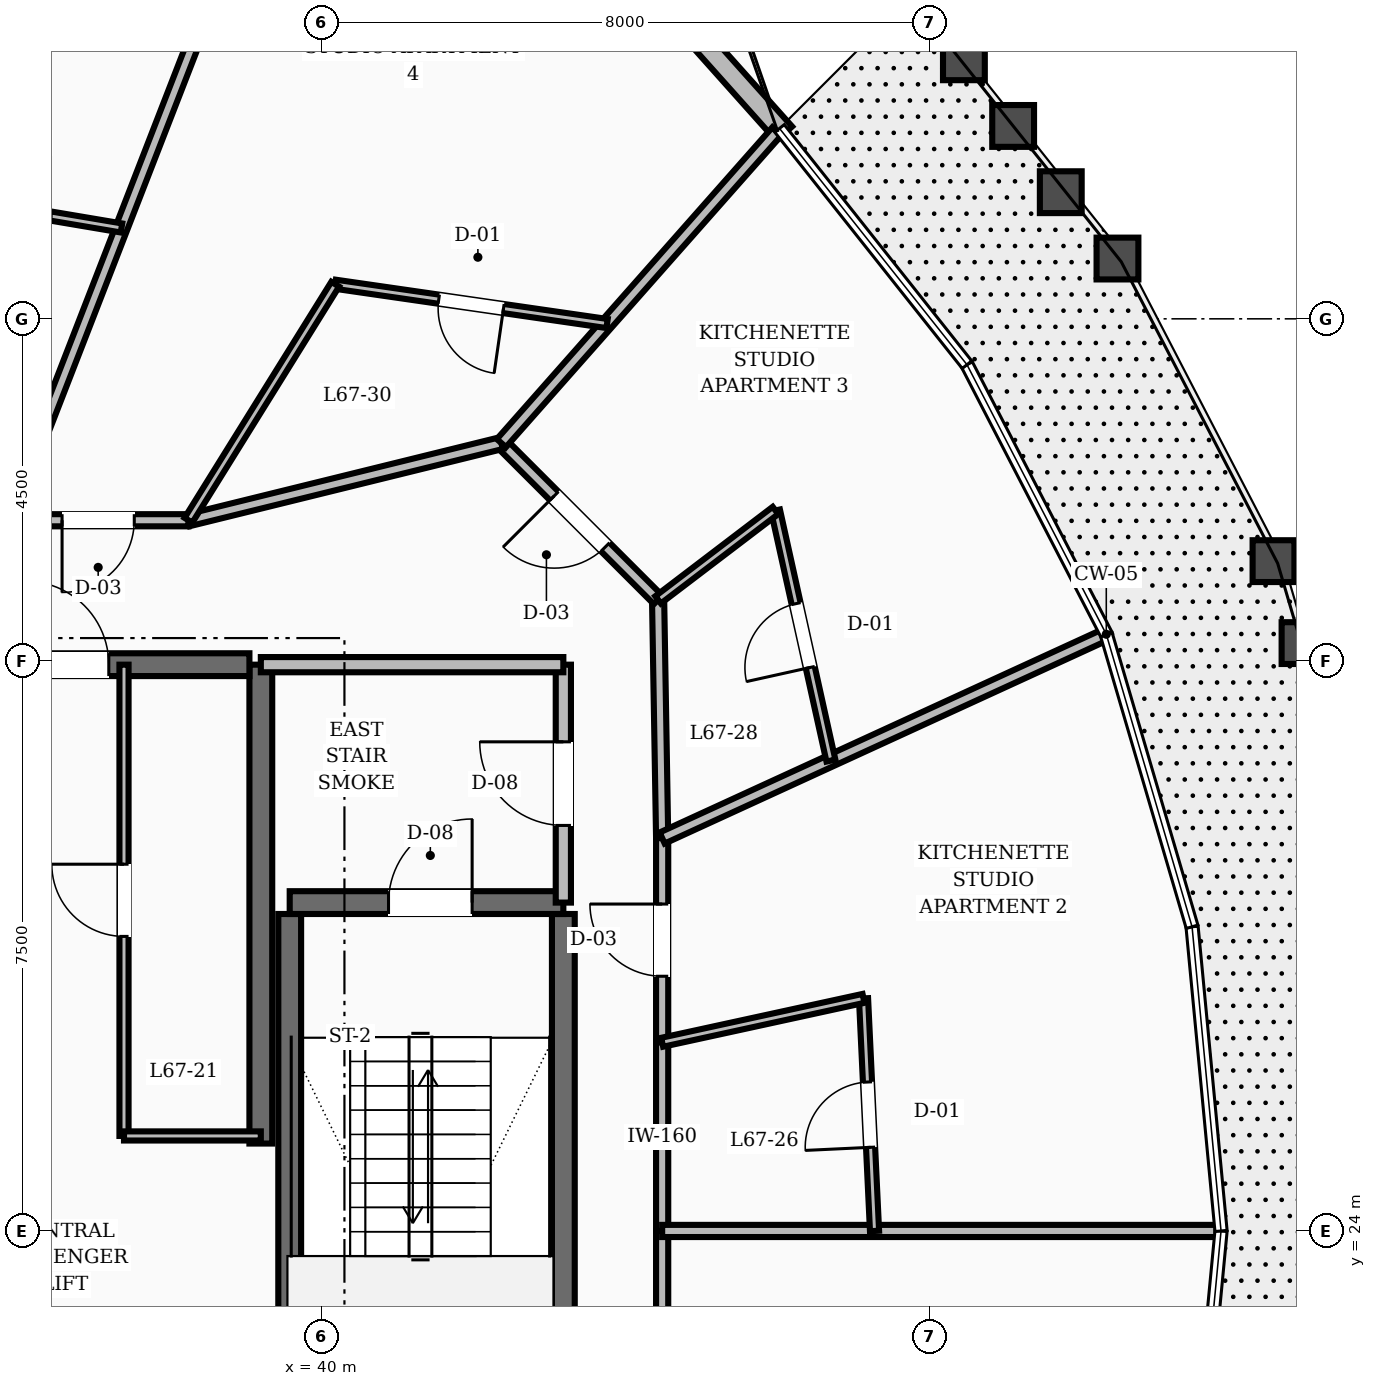
"""IFC4 building model, lengths in metres.
Left out: names, types, materials, properties, quantities, classifications, styles, units other than length and angle.
Written with IfcOpenShell. Run it as: python <this file> out.ifc"""

import sys

from ifc_helpers import new_model, si_unit, direction, frame, frame_2d, origin, place, context, subcontext, project, spatial, rectangle, extrude, element, fill, save


model = new_model("IFC4")
c1 = context("Model", 3, precision=1e-05, world=origin(), true_north=direction((0.0, 1.0)))
c2 = subcontext(c1, "Body", "Model", "MODEL_VIEW")
j1 = project(units=[si_unit("LENGTHUNIT", "METRE"), si_unit("PLANEANGLEUNIT", "RADIAN")], contexts=[c1])
p1 = place(None, origin())
s1 = spatial("IfcSite", under=j1, at=p1, CompositionType="ELEMENT")
p2 = place(p1, origin())
s2 = spatial("IfcBuilding", under=s1, at=p2, CompositionType="ELEMENT")
p3 = place(p2, frame((0.0, 0.0, 258.0)))
s3 = spatial("IfcBuildingStorey", under=s2, at=p3, CompositionType="ELEMENT", Elevation=258.0)
p4 = place(p3, frame((39.2, 25.15, 0.0), z_axis=(0.0, 0.0, 1.0), x_axis=(0.0, 1.0, 0.0)))
e1 = element("IfcWall", 1, at=p4, inside=s3, PredefinedType="SHEAR", context=c2, shape_type="SweptSolid", body=[
    extrude(rectangle(XDim=6.3, YDim=0.3, at=frame_2d((3.15, 0.0))), origin(), (0.0, 0.0, 1.0), 3.6),
])
p5 = place(p3, frame((35.8, 31.45, 0.0), z_axis=(0.0, 0.0, 1.0), x_axis=(1.0, 0.0, 0.0)))
e2 = element("IfcWall", 2, at=p5, inside=s3, PredefinedType="SHEAR", context=c2, shape_type="SweptSolid", body=[
    extrude(rectangle(XDim=3.25, YDim=0.3, at=frame_2d((1.625, 0.0))), origin(), (0.0, 0.0, 1.0), 3.6),
])
p6 = place(p5, frame((0.3, 0.0, 0.0)))
e3 = element("IfcOpeningElement", 3, at=p6, cuts=e2, PredefinedType="OPENING", context=c2, shape_type="SweptSolid", body=[
    extrude(rectangle(XDim=1.1, YDim=2.1, at=frame_2d((0.55, 1.05))), frame((0.0, 0.16, 0.0), z_axis=(0.0, -1.0, 0.0), x_axis=(1.0, 0.0, 0.0)), (0.0, 0.0, 1.0), 0.32),
])
for number, where, z_axis, x_axis in (
    (4, (43.18, 19.43, 0.0), (0.0, 0.0, 1.0), (0.0, 1.0, 0.0)),
    (5, (39.58, 19.43, 0.0), (0.0, 0.0, 1.0), (0.0, 1.0, 0.0)),
):
    element("IfcWall", number, at=place(p3, frame(where, z_axis=z_axis, x_axis=x_axis)), inside=s3, PredefinedType="SHEAR", context=c2, shape_type="SweptSolid", body=[
        extrude(rectangle(XDim=8.74, YDim=0.3, at=frame_2d((4.37, 0.0))), origin(), (0.0, 0.0, 1.0), 3.6),
    ])
p7 = place(p3, frame((39.58, 28.32, 0.0), z_axis=(0.0, 0.0, 1.0), x_axis=(1.0, 0.0, 0.0)))
e6 = element("IfcWall", 6, at=p7, inside=s3, PredefinedType="SHEAR", context=c2, shape_type="SweptSolid", body=[
    extrude(rectangle(XDim=3.6, YDim=0.3, at=frame_2d((1.8, 0.0))), origin(), (0.0, 0.0, 1.0), 3.6),
])
p8 = place(p7, frame((1.3, 0.0, 0.0)))
e7 = element("IfcOpeningElement", 7, at=p8, cuts=e6, PredefinedType="OPENING", context=c2, shape_type="SweptSolid", body=[
    extrude(rectangle(XDim=1.1, YDim=2.1, at=frame_2d((0.55, 1.05))), frame((0.0, 0.16, 0.0), z_axis=(0.0, -1.0, 0.0), x_axis=(1.0, 0.0, 0.0)), (0.0, 0.0, 1.0), 0.32),
])
p9 = place(p3, frame((46.085, 38.437, 0.0), z_axis=(0.0, 0.0, 1.0), x_axis=(-0.666145944146, 0.745821413677, 0.0)))
e8 = element("IfcWall", 8, at=p9, inside=s3, PredefinedType="STANDARD", context=c2, shape_type="SweptSolid", body=[
    extrude(rectangle(XDim=4.137, YDim=0.28, at=frame_2d((2.068, 0.0))), origin(), (0.0, 0.0, 1.0), 2.88),
])
p10 = place(p3, frame((43.18, 28.32, 0.0), z_axis=(0.0, 0.0, 1.0), x_axis=(0.0, 1.0, 0.0)))
e9 = element("IfcWall", 9, at=p10, inside=s3, PredefinedType="SOLIDWALL", context=c2, shape_type="SweptSolid", body=[
    extrude(rectangle(XDim=3.13, YDim=0.2, at=frame_2d((1.565, 0.0))), origin(), (0.0, 0.0, 1.0), 2.87),
])
p11 = place(p10, frame((1.015, 0.0, 0.0)))
e10 = element("IfcOpeningElement", 10, at=p11, cuts=e9, PredefinedType="OPENING", context=c2, shape_type="SweptSolid", body=[
    extrude(rectangle(XDim=1.1, YDim=2.1, at=frame_2d((0.55, 1.05))), frame((0.0, 0.11, 0.0), z_axis=(0.0, -1.0, 0.0), x_axis=(1.0, 0.0, 0.0)), (0.0, 0.0, 1.0), 0.22),
])
p12 = place(p3, frame((39.2, 31.45, 0.0), z_axis=(0.0, 0.0, 1.0), x_axis=(1.0, 0.0, 0.0)))
e11 = element("IfcWall", 11, at=p12, inside=s3, PredefinedType="SOLIDWALL", context=c2, shape_type="SweptSolid", body=[
    extrude(rectangle(XDim=3.98, YDim=0.2, at=frame_2d((1.99, 0.0))), origin(), (0.0, 0.0, 1.0), 2.87),
])
p13 = place(p3, frame((37.4, 25.25, 0.0), z_axis=(0.0, 0.0, 1.0), x_axis=(0.0, 1.0, 0.0)))
e12 = element("IfcWall", 12, at=p13, inside=s3, PredefinedType="PARTITIONING", context=c2, shape_type="SweptSolid", body=[
    extrude(rectangle(XDim=6.2, YDim=0.12, at=frame_2d((3.1, 0.0))), origin(), (0.0, 0.0, 1.0), 2.87),
])
p14 = place(p13, frame((2.625, 0.0, 0.0)))
e13 = element("IfcOpeningElement", 13, at=p14, cuts=e12, PredefinedType="OPENING", context=c2, shape_type="SweptSolid", body=[
    extrude(rectangle(XDim=0.95, YDim=2.1, at=frame_2d((0.475, 1.05))), frame((0.0, 0.07, 0.0), z_axis=(0.0, -1.0, 0.0), x_axis=(1.0, 0.0, 0.0)), (0.0, 0.0, 1.0), 0.14),
])
p15 = place(p3, frame((37.4, 25.25, 0.0), z_axis=(0.0, 0.0, 1.0), x_axis=(1.0, 0.0, 0.0)))
e14 = element("IfcWall", 14, at=p15, inside=s3, PredefinedType="PARTITIONING", context=c2, shape_type="SweptSolid", body=[
    extrude(rectangle(XDim=1.8, YDim=0.12, at=frame_2d((0.9, 0.0))), origin(), (0.0, 0.0, 1.0), 2.87),
])
p16 = place(p3, frame((44.48, 24.0, 0.0), z_axis=(0.0, 0.0, 1.0), x_axis=(0.0, 1.0, 0.0)))
e15 = element("IfcWall", 15, at=p16, inside=s3, PredefinedType="SOLIDWALL", context=c2, shape_type="SweptSolid", body=[
    extrude(rectangle(XDim=2.482, YDim=0.16, at=frame_2d((1.241, 0.0))), origin(), (0.0, 0.0, 1.0), 2.87),
])
p17 = place(p3, frame((44.48, 26.482, 0.0), z_axis=(0.0, 0.0, 1.0), x_axis=(0.0, 1.0, 0.0)))
e16 = element("IfcWall", 16, at=p17, inside=s3, PredefinedType="SOLIDWALL", context=c2, shape_type="SweptSolid", body=[
    extrude(rectangle(XDim=2.687, YDim=0.16, at=frame_2d((1.344, 0.0))), origin(), (0.0, 0.0, 1.0), 2.87),
])
p18 = place(p17, frame((0.868, 0.0, 0.0)))
e17 = element("IfcOpeningElement", 17, at=p18, cuts=e16, PredefinedType="OPENING", context=c2, shape_type="SweptSolid", body=[
    extrude(rectangle(XDim=0.95, YDim=2.1, at=frame_2d((0.475, 1.05))), frame((0.0, 0.09, 0.0), z_axis=(0.0, -1.0, 0.0), x_axis=(1.0, 0.0, 0.0)), (0.0, 0.0, 1.0), 0.18),
])
p19 = place(p3, frame((44.48, 29.169, 0.0), z_axis=(0.0, 0.0, 1.0), x_axis=(-0.016981035134, 0.999855811828, 0.0)))
e18 = element("IfcWall", 18, at=p19, inside=s3, PredefinedType="SOLIDWALL", context=c2, shape_type="SweptSolid", body=[
    extrude(rectangle(XDim=3.134, YDim=0.16, at=frame_2d((1.567, 0.0))), origin(), (0.0, 0.0, 1.0), 2.87),
])
p20 = place(p3, frame((44.427, 32.303, 0.0), z_axis=(0.0, 0.0, 1.0), x_axis=(-0.707106781187, 0.707106781187, 0.0)))
e19 = element("IfcWall", 19, at=p20, inside=s3, PredefinedType="SOLIDWALL", context=c2, shape_type="SweptSolid", body=[
    extrude(rectangle(XDim=2.916, YDim=0.16, at=frame_2d((1.458, 0.0))), origin(), (0.0, 0.0, 1.0), 2.87),
])
p21 = place(p20, frame((0.983, 0.0, 0.0)))
e20 = element("IfcOpeningElement", 20, at=p21, cuts=e19, PredefinedType="OPENING", context=c2, shape_type="SweptSolid", body=[
    extrude(rectangle(XDim=0.95, YDim=2.1, at=frame_2d((0.475, 1.05))), frame((0.0, 0.09, 0.0), z_axis=(0.0, -1.0, 0.0), x_axis=(1.0, 0.0, 0.0)), (0.0, 0.0, 1.0), 0.18),
])
p22 = place(p3, frame((42.365, 34.365, 0.0), z_axis=(0.0, 0.0, 1.0), x_axis=(-0.970939799552, -0.239323850978, 0.0)))
e21 = element("IfcWall", 21, at=p22, inside=s3, PredefinedType="SOLIDWALL", context=c2, shape_type="SweptSolid", body=[
    extrude(rectangle(XDim=4.241, YDim=0.16, at=frame_2d((2.12, 0.0))), origin(), (0.0, 0.0, 1.0), 2.87),
])
p23 = place(p3, frame((38.248, 33.35, 0.0), z_axis=(0.0, 0.0, 1.0), x_axis=(-1.0, 0.0, 0.0)))
e22 = element("IfcWall", 22, at=p23, inside=s3, PredefinedType="SOLIDWALL", context=c2, shape_type="SweptSolid", body=[
    extrude(rectangle(XDim=2.375, YDim=0.16, at=frame_2d((1.188, 0.0))), origin(), (0.0, 0.0, 1.0), 2.87),
])
p24 = place(p23, frame((0.712, 0.0, 0.0)))
e23 = element("IfcOpeningElement", 23, at=p24, cuts=e22, PredefinedType="OPENING", context=c2, shape_type="SweptSolid", body=[
    extrude(rectangle(XDim=0.95, YDim=2.1, at=frame_2d((0.475, 1.05))), frame((0.0, 0.09, 0.0), z_axis=(0.0, -1.0, 0.0), x_axis=(1.0, 0.0, 0.0)), (0.0, 0.0, 1.0), 0.18),
])
p25 = place(p3, frame((44.48, 21.518, 0.0), z_axis=(0.0, 0.0, 1.0), x_axis=(0.0, 1.0, 0.0)))
e24 = element("IfcWall", 24, at=p25, inside=s3, PredefinedType="SOLIDWALL", context=c2, shape_type="SweptSolid", body=[
    extrude(rectangle(XDim=2.482, YDim=0.16, at=frame_2d((1.241, 0.0))), origin(), (0.0, 0.0, 1.0), 2.87),
])
p26 = place(p3, frame((44.48, 24.0, 0.0), z_axis=(0.0, 0.0, 1.0), x_axis=(1.0, 0.0, 0.0)))
e25 = element("IfcWall", 25, at=p26, inside=s3, PredefinedType="SOLIDWALL", context=c2, shape_type="SweptSolid", body=[
    extrude(rectangle(XDim=7.303, YDim=0.16, at=frame_2d((3.651, 0.0))), origin(), (0.0, 0.0, 1.0), 2.87),
])
p27 = place(p3, frame((47.274, 24.0, 0.0), z_axis=(0.0, 0.0, 1.0), x_axis=(-0.047341736084, 0.998878751413, 0.0)))
e26 = element("IfcWall", 26, at=p27, inside=s3, PredefinedType="PARTITIONING", context=c2, shape_type="SweptSolid", body=[
    extrude(rectangle(XDim=3.063, YDim=0.12, at=frame_2d((1.532, 0.0))), origin(), (0.0, 0.0, 1.0), 2.87),
])
p28 = place(p27, frame((1.102, 0.0, 0.0)))
e27 = element("IfcOpeningElement", 27, at=p28, cuts=e26, PredefinedType="OPENING", context=c2, shape_type="SweptSolid", body=[
    extrude(rectangle(XDim=0.86, YDim=2.1, at=frame_2d((0.43, 1.05))), frame((0.0, 0.07, 0.0), z_axis=(0.0, -1.0, 0.0), x_axis=(1.0, 0.0, 0.0)), (0.0, 0.0, 1.0), 0.14),
])
p29 = place(p3, frame((44.48, 26.482, 0.0), z_axis=(0.0, 0.0, 1.0), x_axis=(0.977062450347, 0.212952971622, 0.0)))
e28 = element("IfcWall", 28, at=p29, inside=s3, PredefinedType="PARTITIONING", context=c2, shape_type="SweptSolid", body=[
    extrude(rectangle(XDim=2.711, YDim=0.12, at=frame_2d((1.356, 0.0))), origin(), (0.0, 0.0, 1.0), 2.87),
])
p30 = place(p3, frame((44.48, 29.169, 0.0), z_axis=(0.0, 0.0, 1.0), x_axis=(0.908905892695, 0.417001292833, 0.0)))
e29 = element("IfcWall", 29, at=p30, inside=s3, PredefinedType="SOLIDWALL", context=c2, shape_type="SweptSolid", body=[
    extrude(rectangle(XDim=6.379, YDim=0.16, at=frame_2d((3.189, 0.0))), origin(), (0.0, 0.0, 1.0), 2.87),
])
p31 = place(p3, frame((46.7, 30.188, 0.0), z_axis=(0.0, 0.0, 1.0), x_axis=(-0.21642426277, 0.976299410265, 0.0)))
e30 = element("IfcWall", 30, at=p31, inside=s3, PredefinedType="PARTITIONING", context=c2, shape_type="SweptSolid", body=[
    extrude(rectangle(XDim=3.371, YDim=0.12, at=frame_2d((1.685, 0.0))), origin(), (0.0, 0.0, 1.0), 2.87),
])
p32 = place(p31, frame((1.255, 0.0, 0.0)))
e31 = element("IfcOpeningElement", 31, at=p32, cuts=e30, PredefinedType="OPENING", context=c2, shape_type="SweptSolid", body=[
    extrude(rectangle(XDim=0.86, YDim=2.1, at=frame_2d((0.43, 1.05))), frame((0.0, 0.07, 0.0), z_axis=(0.0, -1.0, 0.0), x_axis=(1.0, 0.0, 0.0)), (0.0, 0.0, 1.0), 0.14),
])
p33 = place(p3, frame((44.427, 32.303, 0.0), z_axis=(0.0, 0.0, 1.0), x_axis=(0.795677115772, 0.605720998015, 0.0)))
e32 = element("IfcWall", 32, at=p33, inside=s3, PredefinedType="PARTITIONING", context=c2, shape_type="SweptSolid", body=[
    extrude(rectangle(XDim=1.941, YDim=0.12, at=frame_2d((0.97, 0.0))), origin(), (0.0, 0.0, 1.0), 2.87),
])
p34 = place(p3, frame((42.365, 34.365, 0.0), z_axis=(0.0, 0.0, 1.0), x_axis=(0.662221669206, 0.749307987969, 0.0)))
e33 = element("IfcWall", 33, at=p34, inside=s3, PredefinedType="SOLIDWALL", context=c2, shape_type="SweptSolid", body=[
    extrude(rectangle(XDim=5.475, YDim=0.16, at=frame_2d((2.738, 0.0))), origin(), (0.0, 0.0, 1.0), 2.87),
])
p35 = place(p3, frame((43.755, 35.938, 0.0), z_axis=(0.0, 0.0, 1.0), x_axis=(-0.989710293441, 0.143085761195, 0.0)))
e34 = element("IfcWall", 34, at=p35, inside=s3, PredefinedType="PARTITIONING", context=c2, shape_type="SweptSolid", body=[
    extrude(rectangle(XDim=3.614, YDim=0.12, at=frame_2d((1.807, 0.0))), origin(), (0.0, 0.0, 1.0), 2.87),
])
p36 = place(p35, frame((1.377, 0.0, 0.0)))
e35 = element("IfcOpeningElement", 35, at=p36, cuts=e34, PredefinedType="OPENING", context=c2, shape_type="SweptSolid", body=[
    extrude(rectangle(XDim=0.86, YDim=2.1, at=frame_2d((0.43, 1.05))), frame((0.0, 0.07, 0.0), z_axis=(0.0, -1.0, 0.0), x_axis=(1.0, 0.0, 0.0)), (0.0, 0.0, 1.0), 0.14),
])
p37 = place(p3, frame((38.248, 33.35, 0.0), z_axis=(0.0, 0.0, 1.0), x_axis=(0.528107212433, 0.849177703532, 0.0)))
e36 = element("IfcWall", 36, at=p37, inside=s3, PredefinedType="PARTITIONING", context=c2, shape_type="SweptSolid", body=[
    extrude(rectangle(XDim=3.657, YDim=0.12, at=frame_2d((1.828, 0.0))), origin(), (0.0, 0.0, 1.0), 2.87),
])
p38 = place(p3, frame((35.873, 33.35, 0.0), z_axis=(0.0, 0.0, 1.0), x_axis=(0.362124603768, 0.932129696634, 0.0)))
e37 = element("IfcWall", 37, at=p38, inside=s3, PredefinedType="SOLIDWALL", context=c2, shape_type="SweptSolid", body=[
    extrude(rectangle(XDim=10.806, YDim=0.16, at=frame_2d((5.403, 0.0))), origin(), (0.0, 0.0, 1.0), 2.87),
])
p39 = place(p3, frame((37.367, 37.195, 0.0), z_axis=(0.0, 0.0, 1.0), x_axis=(-0.986081513145, 0.166262591807, 0.0)))
e38 = element("IfcWall", 38, at=p39, inside=s3, PredefinedType="PARTITIONING", context=c2, shape_type="SweptSolid", body=[
    extrude(rectangle(XDim=2.74, YDim=0.12, at=frame_2d((1.37, 0.0))), origin(), (0.0, 0.0, 1.0), 2.87),
])
p40 = place(p39, frame((0.94, 0.0, 0.0)))
e39 = element("IfcOpeningElement", 39, at=p40, cuts=e38, PredefinedType="OPENING", context=c2, shape_type="SweptSolid", body=[
    extrude(rectangle(XDim=0.86, YDim=2.1, at=frame_2d((0.43, 1.05))), frame((0.0, 0.07, 0.0), z_axis=(0.0, -1.0, 0.0), x_axis=(1.0, 0.0, 0.0)), (0.0, 0.0, 1.0), 0.14),
])
p41 = place(p8, origin())
e40 = element("IfcDoor", 40, at=p41, inside=s3, OperationType="SINGLE_SWING_RIGHT", PredefinedType="DOOR", context=c2, shape_type="SweptSolid", body=[
    extrude(rectangle(XDim=1.1, YDim=2.1, at=frame_2d((0.55, 1.05))), frame((0.0, 0.025, 0.0), z_axis=(0.0, -1.0, 0.0), x_axis=(1.0, 0.0, 0.0)), (0.0, 0.0, 1.0), 0.05),
])
fill(e7, e40)
p42 = place(p11, origin())
e41 = element("IfcDoor", 41, at=p42, inside=s3, OperationType="SINGLE_SWING_RIGHT", PredefinedType="DOOR", context=c2, shape_type="SweptSolid", body=[
    extrude(rectangle(XDim=1.1, YDim=2.1, at=frame_2d((0.55, 1.05))), frame((0.0, 0.025, 0.0), z_axis=(0.0, -1.0, 0.0), x_axis=(1.0, 0.0, 0.0)), (0.0, 0.0, 1.0), 0.05),
])
fill(e10, e41)
p43 = place(p6, origin())
e42 = element("IfcDoor", 42, at=p43, inside=s3, OperationType="SINGLE_SWING_LEFT", PredefinedType="DOOR", context=c2, shape_type="SweptSolid", body=[
    extrude(rectangle(XDim=1.1, YDim=2.1, at=frame_2d((0.55, 1.05))), frame((0.0, 0.025, 0.0), z_axis=(0.0, -1.0, 0.0), x_axis=(1.0, 0.0, 0.0)), (0.0, 0.0, 1.0), 0.05),
])
fill(e3, e42)
p44 = place(p14, origin())
e43 = element("IfcDoor", 43, at=p44, inside=s3, OperationType="SINGLE_SWING_RIGHT", PredefinedType="DOOR", context=c2, shape_type="SweptSolid", body=[
    extrude(rectangle(XDim=0.95, YDim=2.1, at=frame_2d((0.475, 1.05))), frame((0.0, 0.025, 0.0), z_axis=(0.0, -1.0, 0.0), x_axis=(1.0, 0.0, 0.0)), (0.0, 0.0, 1.0), 0.05),
])
fill(e13, e43)
p45 = place(p28, origin())
e44 = element("IfcDoor", 44, at=p45, inside=s3, OperationType="SINGLE_SWING_LEFT", PredefinedType="DOOR", context=c2, shape_type="SweptSolid", body=[
    extrude(rectangle(XDim=0.86, YDim=2.1, at=frame_2d((0.43, 1.05))), frame((0.0, 0.025, 0.0), z_axis=(0.0, -1.0, 0.0), x_axis=(1.0, 0.0, 0.0)), (0.0, 0.0, 1.0), 0.05),
])
fill(e27, e44)
p46 = place(p18, origin())
e45 = element("IfcDoor", 45, at=p46, inside=s3, OperationType="SINGLE_SWING_RIGHT", PredefinedType="DOOR", context=c2, shape_type="SweptSolid", body=[
    extrude(rectangle(XDim=0.95, YDim=2.1, at=frame_2d((0.475, 1.05))), frame((0.0, 0.025, 0.0), z_axis=(0.0, -1.0, 0.0), x_axis=(1.0, 0.0, 0.0)), (0.0, 0.0, 1.0), 0.05),
])
fill(e17, e45)
p47 = place(p32, origin())
e46 = element("IfcDoor", 46, at=p47, inside=s3, OperationType="SINGLE_SWING_LEFT", PredefinedType="DOOR", context=c2, shape_type="SweptSolid", body=[
    extrude(rectangle(XDim=0.86, YDim=2.1, at=frame_2d((0.43, 1.05))), frame((0.0, 0.025, 0.0), z_axis=(0.0, -1.0, 0.0), x_axis=(1.0, 0.0, 0.0)), (0.0, 0.0, 1.0), 0.05),
])
fill(e31, e46)
p48 = place(p21, origin())
e47 = element("IfcDoor", 47, at=p48, inside=s3, OperationType="SINGLE_SWING_RIGHT", PredefinedType="DOOR", context=c2, shape_type="SweptSolid", body=[
    extrude(rectangle(XDim=0.95, YDim=2.1, at=frame_2d((0.475, 1.05))), frame((0.0, 0.025, 0.0), z_axis=(0.0, -1.0, 0.0), x_axis=(1.0, 0.0, 0.0)), (0.0, 0.0, 1.0), 0.05),
])
fill(e20, e47)
p49 = place(p36, origin())
e48 = element("IfcDoor", 48, at=p49, inside=s3, OperationType="SINGLE_SWING_LEFT", PredefinedType="DOOR", context=c2, shape_type="SweptSolid", body=[
    extrude(rectangle(XDim=0.86, YDim=2.1, at=frame_2d((0.43, 1.05))), frame((0.0, 0.025, 0.0), z_axis=(0.0, -1.0, 0.0), x_axis=(1.0, 0.0, 0.0)), (0.0, 0.0, 1.0), 0.05),
])
fill(e35, e48)
p50 = place(p24, origin())
e49 = element("IfcDoor", 49, at=p50, inside=s3, OperationType="SINGLE_SWING_RIGHT", PredefinedType="DOOR", context=c2, shape_type="SweptSolid", body=[
    extrude(rectangle(XDim=0.95, YDim=2.1, at=frame_2d((0.475, 1.05))), frame((0.0, 0.025, 0.0), z_axis=(0.0, -1.0, 0.0), x_axis=(1.0, 0.0, 0.0)), (0.0, 0.0, 1.0), 0.05),
])
fill(e23, e49)
save(model, sys.argv[1])
